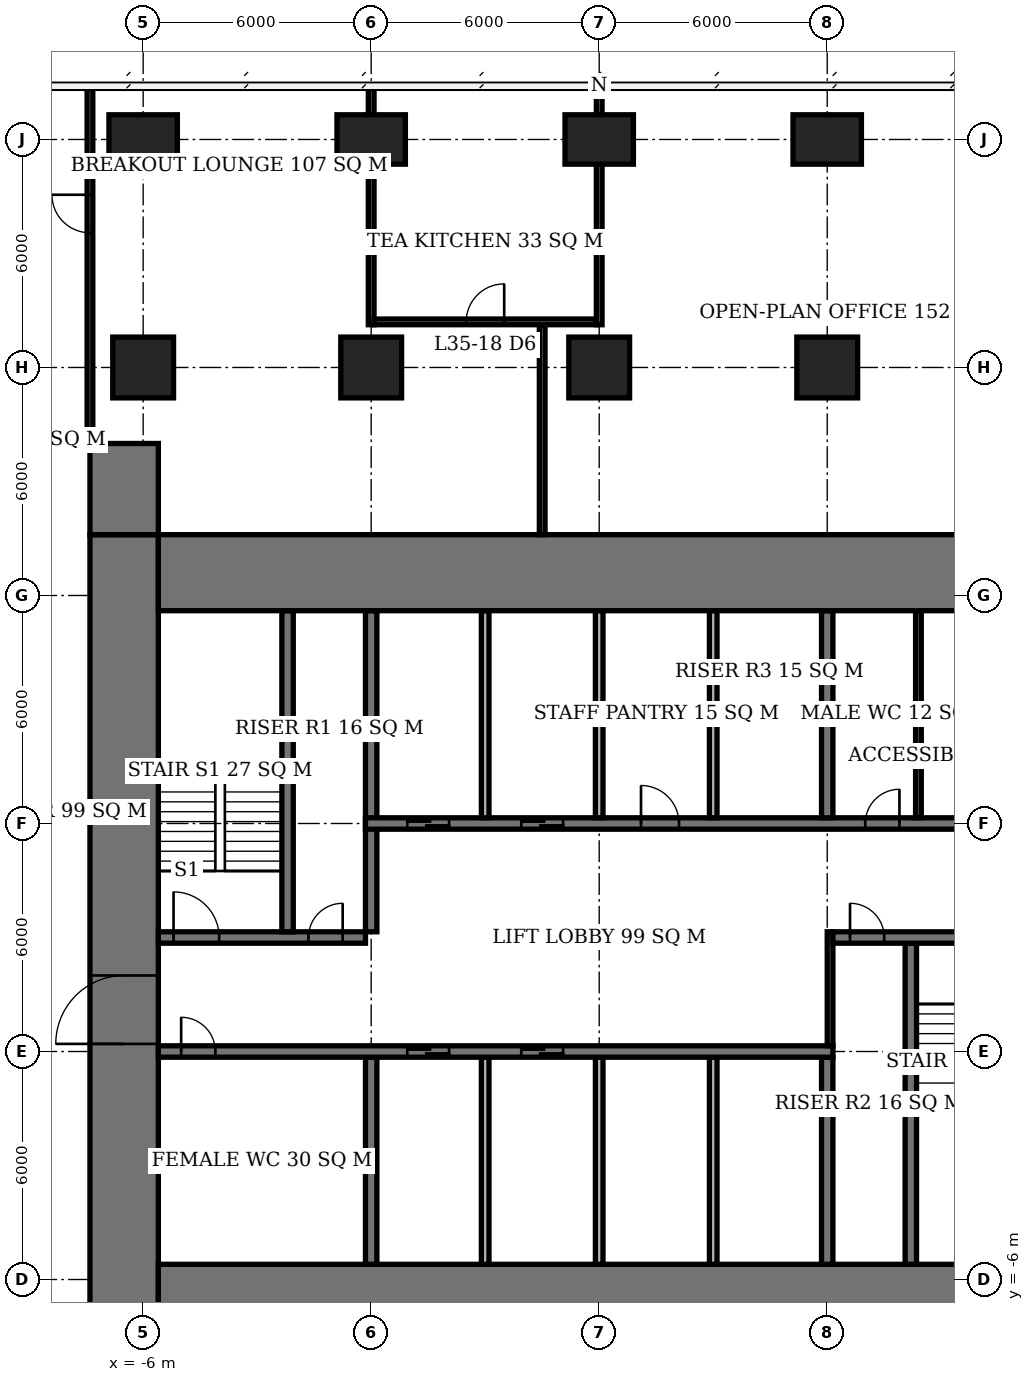
"""IFC4 building model, lengths in metres.
Left out: names, types, materials, properties, quantities, classifications, styles, units other than length and angle.
Written with IfcOpenShell. Run it as: python <this file> out.ifc"""

import sys

from ifc_helpers import new_model, si_unit, direction, frame, frame_2d, origin, origin_2d, place, context, subcontext, project, spatial, rectangle, extrude, element, fill, save


model = new_model("IFC4")
c1 = context("Model", 3, precision=1e-05, world=origin(), true_north=direction((0.0, 1.0)))
c2 = subcontext(c1, "Body", "Model", "MODEL_VIEW")
j1 = project(units=[si_unit("LENGTHUNIT", "METRE"), si_unit("PLANEANGLEUNIT", "RADIAN")], contexts=[c1])
p1 = place(None, origin())
s1 = spatial("IfcSite", under=j1, at=p1, CompositionType="ELEMENT")
p2 = place(p1, origin())
s2 = spatial("IfcBuilding", under=s1, at=p2, CompositionType="ELEMENT")
p3 = place(p2, frame((0.0, 0.0, 144.5)))
s3 = spatial("IfcBuildingStorey", under=s2, at=p3, CompositionType="ELEMENT", Elevation=144.5)
p4 = place(p3, frame((-6.0, 18.0, 0.0), z_axis=(0.0, 0.0, 1.0), x_axis=(1.0, 0.0, 0.0)))
e1 = element("IfcColumn", 1, at=p4, inside=s3, PredefinedType="COLUMN", context=c2, shape_type="SweptSolid", body=[
    extrude(rectangle(XDim=1.6, YDim=1.6, at=origin_2d()), origin(), (0.0, 0.0, 1.0), 3.9),
])
p5 = place(p3, frame((-6.0, 24.0, 0.0), z_axis=(0.0, 0.0, 1.0), x_axis=(1.0, 0.0, 0.0)))
e2 = element("IfcColumn", 2, at=p5, inside=s3, PredefinedType="COLUMN", context=c2, shape_type="SweptSolid", body=[
    extrude(rectangle(XDim=1.8, YDim=1.3, at=origin_2d()), origin(), (0.0, 0.0, 1.0), 3.9),
])
p6 = place(p3, frame((0.0, 18.0, 0.0), z_axis=(0.0, 0.0, 1.0), x_axis=(1.0, 0.0, 0.0)))
e3 = element("IfcColumn", 3, at=p6, inside=s3, PredefinedType="COLUMN", context=c2, shape_type="SweptSolid", body=[
    extrude(rectangle(XDim=1.6, YDim=1.6, at=origin_2d()), origin(), (0.0, 0.0, 1.0), 3.9),
])
p7 = place(p3, frame((0.0, 24.0, 0.0), z_axis=(0.0, 0.0, 1.0), x_axis=(1.0, 0.0, 0.0)))
e4 = element("IfcColumn", 4, at=p7, inside=s3, PredefinedType="COLUMN", context=c2, shape_type="SweptSolid", body=[
    extrude(rectangle(XDim=1.8, YDim=1.3, at=origin_2d()), origin(), (0.0, 0.0, 1.0), 3.9),
])
p8 = place(p3, frame((6.0, 18.0, 0.0), z_axis=(0.0, 0.0, 1.0), x_axis=(1.0, 0.0, 0.0)))
e5 = element("IfcColumn", 5, at=p8, inside=s3, PredefinedType="COLUMN", context=c2, shape_type="SweptSolid", body=[
    extrude(rectangle(XDim=1.6, YDim=1.6, at=origin_2d()), origin(), (0.0, 0.0, 1.0), 3.9),
])
p9 = place(p3, frame((6.0, 24.0, 0.0), z_axis=(0.0, 0.0, 1.0), x_axis=(1.0, 0.0, 0.0)))
e6 = element("IfcColumn", 6, at=p9, inside=s3, PredefinedType="COLUMN", context=c2, shape_type="SweptSolid", body=[
    extrude(rectangle(XDim=1.8, YDim=1.3, at=origin_2d()), origin(), (0.0, 0.0, 1.0), 3.9),
])
p10 = place(p3, frame((12.0, 18.0, 0.0), z_axis=(0.0, 0.0, 1.0), x_axis=(1.0, 0.0, 0.0)))
e7 = element("IfcColumn", 7, at=p10, inside=s3, PredefinedType="COLUMN", context=c2, shape_type="SweptSolid", body=[
    extrude(rectangle(XDim=1.6, YDim=1.6, at=origin_2d()), origin(), (0.0, 0.0, 1.0), 3.9),
])
p11 = place(p3, frame((12.0, 24.0, 0.0), z_axis=(0.0, 0.0, 1.0), x_axis=(1.0, 0.0, 0.0)))
e8 = element("IfcColumn", 8, at=p11, inside=s3, PredefinedType="COLUMN", context=c2, shape_type="SweptSolid", body=[
    extrude(rectangle(XDim=1.8, YDim=1.3, at=origin_2d()), origin(), (0.0, 0.0, 1.0), 3.9),
])
for number, where, z_axis, x_axis in (
    (9, (-5.6, -6.6, 0.0), (0.0, 0.0, 1.0), (1.0, 0.0, 0.0)),
    (10, (-5.6, 12.6, 0.0), (0.0, 0.0, 1.0), (1.0, 0.0, 0.0)),
):
    element("IfcWall", number, at=place(p3, frame(where, z_axis=z_axis, x_axis=x_axis)), inside=s3, PredefinedType="SHEAR", context=c2, shape_type="SweptSolid", body=[
        extrude(rectangle(XDim=23.2, YDim=2.0, at=frame_2d((11.6, 0.0))), origin(), (0.0, 0.0, 1.0), 3.9),
    ])
p12 = place(p3, frame((-6.5, -7.6, 0.0), z_axis=(0.0, 0.0, 1.0), x_axis=(0.0, 1.0, 0.0)))
e11 = element("IfcWall", 11, at=p12, inside=s3, PredefinedType="SHEAR", context=c2, shape_type="SweptSolid", body=[
    extrude(rectangle(XDim=21.2, YDim=1.8, at=frame_2d((10.6, 0.0))), origin(), (0.0, 0.0, 1.0), 3.9),
])
p13 = place(p12, frame((7.8, 0.0, 0.0)))
e12 = element("IfcOpeningElement", 12, at=p13, cuts=e11, PredefinedType="OPENING", context=c2, shape_type="SweptSolid", body=[
    extrude(rectangle(XDim=1.8, YDim=2.4, at=frame_2d((0.9, 1.2))), frame((0.0, 0.91, 0.0), z_axis=(0.0, -1.0, 0.0), x_axis=(1.0, 0.0, 0.0)), (0.0, 0.0, 1.0), 1.82),
])
p14 = place(p3, frame((-6.5, 13.6, 0.0), z_axis=(0.0, 0.0, 1.0), x_axis=(0.0, 1.0, 0.0)))
e13 = element("IfcWall", 13, at=p14, inside=s3, PredefinedType="SHEAR", context=c2, shape_type="SweptSolid", body=[
    extrude(rectangle(XDim=2.4, YDim=1.8, at=frame_2d((1.2, 0.0))), origin(), (0.0, 0.0, 1.0), 3.9),
])
p15 = place(p3, frame((-5.6, 0.0, 0.0), z_axis=(0.0, 0.0, 1.0), x_axis=(1.0, 0.0, 0.0)))
e14 = element("IfcWall", 14, at=p15, inside=s3, PredefinedType="SHEAR", context=c2, shape_type="SweptSolid", body=[
    extrude(rectangle(XDim=17.75, YDim=0.3, at=frame_2d((8.875, 0.0))), origin(), (0.0, 0.0, 1.0), 3.9),
])
p16 = place(p15, frame((0.6, 0.0, 0.0)))
e15 = element("IfcOpeningElement", 15, at=p16, cuts=e14, PredefinedType="OPENING", context=c2, shape_type="SweptSolid", body=[
    extrude(rectangle(XDim=0.9, YDim=2.1, at=frame_2d((0.45, 1.05))), frame((0.0, 0.16, 0.0), z_axis=(0.0, -1.0, 0.0), x_axis=(1.0, 0.0, 0.0)), (0.0, 0.0, 1.0), 0.32),
])
p17 = place(p15, frame((6.55, 0.0, 0.0)))
e16 = element("IfcOpeningElement", 16, at=p17, cuts=e14, PredefinedType="OPENING", context=c2, shape_type="SweptSolid", body=[
    extrude(rectangle(XDim=1.1, YDim=2.1, at=frame_2d((0.55, 1.05))), frame((0.0, 0.16, 0.0), z_axis=(0.0, -1.0, 0.0), x_axis=(1.0, 0.0, 0.0)), (0.0, 0.0, 1.0), 0.32),
])
p18 = place(p15, frame((9.55, 0.0, 0.0)))
e17 = element("IfcOpeningElement", 17, at=p18, cuts=e14, PredefinedType="OPENING", context=c2, shape_type="SweptSolid", body=[
    extrude(rectangle(XDim=1.1, YDim=2.1, at=frame_2d((0.55, 1.05))), frame((0.0, 0.16, 0.0), z_axis=(0.0, -1.0, 0.0), x_axis=(1.0, 0.0, 0.0)), (0.0, 0.0, 1.0), 0.32),
])
p19 = place(p3, frame((-5.6, 3.0, 0.0), z_axis=(0.0, 0.0, 1.0), x_axis=(1.0, 0.0, 0.0)))
e18 = element("IfcWall", 18, at=p19, inside=s3, PredefinedType="SHEAR", context=c2, shape_type="SweptSolid", body=[
    extrude(rectangle(XDim=5.45, YDim=0.3, at=frame_2d((2.725, 0.0))), origin(), (0.0, 0.0, 1.0), 3.9),
])
p20 = place(p19, frame((0.4, 0.0, 0.0)))
e19 = element("IfcOpeningElement", 19, at=p20, cuts=e18, PredefinedType="OPENING", context=c2, shape_type="SweptSolid", body=[
    extrude(rectangle(XDim=1.2, YDim=2.1, at=frame_2d((0.6, 1.05))), frame((0.0, 0.16, 0.0), z_axis=(0.0, -1.0, 0.0), x_axis=(1.0, 0.0, 0.0)), (0.0, 0.0, 1.0), 0.32),
])
p21 = place(p19, frame((3.95, 0.0, 0.0)))
e20 = element("IfcOpeningElement", 20, at=p21, cuts=e18, PredefinedType="OPENING", context=c2, shape_type="SweptSolid", body=[
    extrude(rectangle(XDim=0.9, YDim=2.1, at=frame_2d((0.45, 1.05))), frame((0.0, 0.16, 0.0), z_axis=(0.0, -1.0, 0.0), x_axis=(1.0, 0.0, 0.0)), (0.0, 0.0, 1.0), 0.32),
])
p22 = place(p3, frame((12.15, 3.0, 0.0), z_axis=(0.0, 0.0, 1.0), x_axis=(1.0, 0.0, 0.0)))
e21 = element("IfcWall", 21, at=p22, inside=s3, PredefinedType="SHEAR", context=c2, shape_type="SweptSolid", body=[
    extrude(rectangle(XDim=5.45, YDim=0.3, at=frame_2d((2.725, 0.0))), origin(), (0.0, 0.0, 1.0), 3.9),
])
p23 = place(p22, frame((3.25, 0.0, 0.0)))
e22 = element("IfcOpeningElement", 22, at=p23, cuts=e21, PredefinedType="OPENING", context=c2, shape_type="SweptSolid", body=[
    extrude(rectangle(XDim=1.2, YDim=2.1, at=frame_2d((0.6, 1.05))), frame((0.0, 0.16, 0.0), z_axis=(0.0, -1.0, 0.0), x_axis=(1.0, 0.0, 0.0)), (0.0, 0.0, 1.0), 0.32),
])
p24 = place(p22, frame((0.45, 0.0, 0.0)))
e23 = element("IfcOpeningElement", 23, at=p24, cuts=e21, PredefinedType="OPENING", context=c2, shape_type="SweptSolid", body=[
    extrude(rectangle(XDim=0.9, YDim=2.1, at=frame_2d((0.45, 1.05))), frame((0.0, 0.16, 0.0), z_axis=(0.0, -1.0, 0.0), x_axis=(1.0, 0.0, 0.0)), (0.0, 0.0, 1.0), 0.32),
])
p25 = place(p3, frame((-0.15, 6.0, 0.0), z_axis=(0.0, 0.0, 1.0), x_axis=(1.0, 0.0, 0.0)))
e24 = element("IfcWall", 24, at=p25, inside=s3, PredefinedType="SHEAR", context=c2, shape_type="SweptSolid", body=[
    extrude(rectangle(XDim=17.75, YDim=0.3, at=frame_2d((8.875, 0.0))), origin(), (0.0, 0.0, 1.0), 3.9),
])
p26 = place(p25, frame((13.15, 0.0, 0.0)))
e25 = element("IfcOpeningElement", 25, at=p26, cuts=e24, PredefinedType="OPENING", context=c2, shape_type="SweptSolid", body=[
    extrude(rectangle(XDim=0.9, YDim=2.1, at=frame_2d((0.45, 1.05))), frame((0.0, 0.16, 0.0), z_axis=(0.0, -1.0, 0.0), x_axis=(1.0, 0.0, 0.0)), (0.0, 0.0, 1.0), 0.32),
])
p27 = place(p25, frame((16.25, 0.0, 0.0)))
e26 = element("IfcOpeningElement", 26, at=p27, cuts=e24, PredefinedType="OPENING", context=c2, shape_type="SweptSolid", body=[
    extrude(rectangle(XDim=1.0, YDim=2.1, at=frame_2d((0.5, 1.05))), frame((0.0, 0.16, 0.0), z_axis=(0.0, -1.0, 0.0), x_axis=(1.0, 0.0, 0.0)), (0.0, 0.0, 1.0), 0.32),
])
p28 = place(p25, frame((7.25, 0.0, 0.0)))
e27 = element("IfcOpeningElement", 27, at=p28, cuts=e24, PredefinedType="OPENING", context=c2, shape_type="SweptSolid", body=[
    extrude(rectangle(XDim=1.0, YDim=2.1, at=frame_2d((0.5, 1.05))), frame((0.0, 0.16, 0.0), z_axis=(0.0, -1.0, 0.0), x_axis=(1.0, 0.0, 0.0)), (0.0, 0.0, 1.0), 0.32),
])
p29 = place(p25, frame((1.1, 0.0, 0.0)))
e28 = element("IfcOpeningElement", 28, at=p29, cuts=e24, PredefinedType="OPENING", context=c2, shape_type="SweptSolid", body=[
    extrude(rectangle(XDim=1.1, YDim=2.1, at=frame_2d((0.55, 1.05))), frame((0.0, 0.16, 0.0), z_axis=(0.0, -1.0, 0.0), x_axis=(1.0, 0.0, 0.0)), (0.0, 0.0, 1.0), 0.32),
])
p30 = place(p25, frame((4.1, 0.0, 0.0)))
e29 = element("IfcOpeningElement", 29, at=p30, cuts=e24, PredefinedType="OPENING", context=c2, shape_type="SweptSolid", body=[
    extrude(rectangle(XDim=1.1, YDim=2.1, at=frame_2d((0.55, 1.05))), frame((0.0, 0.16, 0.0), z_axis=(0.0, -1.0, 0.0), x_axis=(1.0, 0.0, 0.0)), (0.0, 0.0, 1.0), 0.32),
])
p31 = place(p3, frame((0.0, -5.6, 0.0), z_axis=(0.0, 0.0, 1.0), x_axis=(0.0, 1.0, 0.0)))
e30 = element("IfcWall", 30, at=p31, inside=s3, PredefinedType="SHEAR", context=c2, shape_type="SweptSolid", body=[
    extrude(rectangle(XDim=5.45, YDim=0.3, at=frame_2d((2.725, 0.0))), origin(), (0.0, 0.0, 1.0), 3.9),
])
p32 = place(p3, frame((0.0, 3.15, 0.0), z_axis=(0.0, 0.0, 1.0), x_axis=(0.0, 1.0, 0.0)))
e31 = element("IfcWall", 31, at=p32, inside=s3, PredefinedType="SHEAR", context=c2, shape_type="SweptSolid", body=[
    extrude(rectangle(XDim=8.45, YDim=0.3, at=frame_2d((4.225, 0.0))), origin(), (0.0, 0.0, 1.0), 3.9),
])
for number, where, z_axis, x_axis in (
    (32, (12.0, -5.6, 0.0), (0.0, 0.0, 1.0), (0.0, 1.0, 0.0)),
    (33, (12.0, 6.15, 0.0), (0.0, 0.0, 1.0), (0.0, 1.0, 0.0)),
):
    element("IfcWall", number, at=place(p3, frame(where, z_axis=z_axis, x_axis=x_axis)), inside=s3, PredefinedType="SHEAR", context=c2, shape_type="SweptSolid", body=[
        extrude(rectangle(XDim=5.45, YDim=0.3, at=frame_2d((2.725, 0.0))), origin(), (0.0, 0.0, 1.0), 3.9),
    ])
for number, where, z_axis, x_axis in (
    (34, (-2.2, 3.15, 0.0), (0.0, 0.0, 1.0), (0.0, 1.0, 0.0)),
    (35, (14.2, -5.6, 0.0), (0.0, 0.0, 1.0), (0.0, 1.0, 0.0)),
):
    element("IfcWall", number, at=place(p3, frame(where, z_axis=z_axis, x_axis=x_axis)), inside=s3, PredefinedType="SHEAR", context=c2, shape_type="SweptSolid", body=[
        extrude(rectangle(XDim=8.45, YDim=0.3, at=frame_2d((4.225, 0.0))), origin(), (0.0, 0.0, 1.0), 3.9),
    ])
for number, where, z_axis, x_axis in (
    (36, (3.0, 6.15, 0.0), (0.0, 0.0, 1.0), (0.0, 1.0, 0.0)),
    (37, (6.0, 6.15, 0.0), (0.0, 0.0, 1.0), (0.0, 1.0, 0.0)),
    (38, (9.0, 6.15, 0.0), (0.0, 0.0, 1.0), (0.0, 1.0, 0.0)),
    (39, (3.0, -5.6, 0.0), (0.0, 0.0, 1.0), (0.0, 1.0, 0.0)),
    (40, (6.0, -5.6, 0.0), (0.0, 0.0, 1.0), (0.0, 1.0, 0.0)),
    (41, (9.0, -5.6, 0.0), (0.0, 0.0, 1.0), (0.0, 1.0, 0.0)),
):
    element("IfcWall", number, at=place(p3, frame(where, z_axis=z_axis, x_axis=x_axis)), inside=s3, PredefinedType="SOLIDWALL", context=c2, shape_type="SweptSolid", body=[
        extrude(rectangle(XDim=5.45, YDim=0.2, at=frame_2d((2.725, 0.0))), origin(), (0.0, 0.0, 1.0), 3.9),
    ])
p33 = place(p3, frame((14.4, 6.15, 0.0), z_axis=(0.0, 0.0, 1.0), x_axis=(0.0, 1.0, 0.0)))
e42 = element("IfcWall", 42, at=p33, inside=s3, PredefinedType="PLUMBINGWALL", context=c2, shape_type="SweptSolid", body=[
    extrude(rectangle(XDim=5.45, YDim=0.15, at=frame_2d((2.725, 0.0))), origin(), (0.0, 0.0, 1.0), 3.65),
])
p34 = place(p3, frame((0.075, 19.2, 0.0), z_axis=(0.0, 0.0, 1.0), x_axis=(1.0, 0.0, 0.0)))
e43 = element("IfcWall", 43, at=p34, inside=s3, PredefinedType="PARTITIONING", context=c2, shape_type="SweptSolid", body=[
    extrude(rectangle(XDim=5.85, YDim=0.15, at=frame_2d((2.925, 0.0))), origin(), (0.0, 0.0, 1.0), 3.65),
])
p35 = place(p34, frame((2.425, 0.0, 0.0)))
e44 = element("IfcOpeningElement", 44, at=p35, cuts=e43, PredefinedType="OPENING", context=c2, shape_type="SweptSolid", body=[
    extrude(rectangle(XDim=1.0, YDim=2.1, at=frame_2d((0.5, 1.05))), frame((0.0, 0.085, 0.0), z_axis=(0.0, -1.0, 0.0), x_axis=(1.0, 0.0, 0.0)), (0.0, 0.0, 1.0), 0.17),
])
p36 = place(p3, frame((0.0, 19.125, 0.0), z_axis=(0.0, 0.0, 1.0), x_axis=(0.0, 1.0, 0.0)))
e45 = element("IfcWall", 45, at=p36, inside=s3, PredefinedType="PARTITIONING", context=c2, shape_type="SweptSolid", body=[
    extrude(rectangle(XDim=4.225, YDim=0.15, at=frame_2d((2.113, 0.0))), origin(), (0.0, 0.0, 1.0), 3.65),
])
p37 = place(p3, frame((0.0, 24.65, 0.0), z_axis=(0.0, 0.0, 1.0), x_axis=(0.0, 1.0, 0.0)))
e46 = element("IfcWall", 46, at=p37, inside=s3, PredefinedType="PARTITIONING", context=c2, shape_type="SweptSolid", body=[
    extrude(rectangle(XDim=0.75, YDim=0.15, at=frame_2d((0.375, 0.0))), origin(), (0.0, 0.0, 1.0), 3.65),
])
p38 = place(p3, frame((6.0, 19.125, 0.0), z_axis=(0.0, 0.0, 1.0), x_axis=(0.0, 1.0, 0.0)))
e47 = element("IfcWall", 47, at=p38, inside=s3, PredefinedType="PARTITIONING", context=c2, shape_type="SweptSolid", body=[
    extrude(rectangle(XDim=4.225, YDim=0.15, at=frame_2d((2.113, 0.0))), origin(), (0.0, 0.0, 1.0), 3.65),
])
p39 = place(p3, frame((6.0, 24.65, 0.0), z_axis=(0.0, 0.0, 1.0), x_axis=(0.0, 1.0, 0.0)))
e48 = element("IfcWall", 48, at=p39, inside=s3, PredefinedType="PARTITIONING", context=c2, shape_type="SweptSolid", body=[
    extrude(rectangle(XDim=0.7, YDim=0.15, at=frame_2d((0.35, 0.0))), origin(), (0.0, 0.0, 1.0), 3.65),
])
p40 = place(p3, frame((-7.4, 16.0, 0.0), z_axis=(0.0, 0.0, 1.0), x_axis=(0.0, 1.0, 0.0)))
e49 = element("IfcWall", 49, at=p40, inside=s3, PredefinedType="PARTITIONING", context=c2, shape_type="SweptSolid", body=[
    extrude(rectangle(XDim=9.4, YDim=0.15, at=frame_2d((4.7, 0.0))), origin(), (0.0, 0.0, 1.0), 3.65),
])
p41 = place(p40, frame((5.545, 0.0, 0.0)))
e50 = element("IfcOpeningElement", 50, at=p41, cuts=e49, PredefinedType="OPENING", context=c2, shape_type="SweptSolid", body=[
    extrude(rectangle(XDim=1.0, YDim=2.1, at=frame_2d((0.5, 1.05))), frame((0.0, 0.085, 0.0), z_axis=(0.0, -1.0, 0.0), x_axis=(1.0, 0.0, 0.0)), (0.0, 0.0, 1.0), 0.17),
])
p42 = place(p3, frame((4.5, 13.6, 0.0), z_axis=(0.0, 0.0, 1.0), x_axis=(0.0, 1.0, 0.0)))
e51 = element("IfcWall", 51, at=p42, inside=s3, PredefinedType="PARTITIONING", context=c2, shape_type="SweptSolid", body=[
    extrude(rectangle(XDim=5.525, YDim=0.15, at=frame_2d((2.762, 0.0))), origin(), (0.0, 0.0, 1.0), 3.65),
])
p43 = place(p3, frame((12.075, 0.15, 0.0), z_axis=(0.0, 0.0, 1.0), x_axis=(0.0, 1.0, 0.0)))
e52 = element("IfcWall", 52, at=p43, inside=s3, PredefinedType="PARTITIONING", context=c2, shape_type="SweptSolid", body=[
    extrude(rectangle(XDim=3.0, YDim=0.15, at=frame_2d((1.5, 0.0))), origin(), (0.0, 0.0, 1.0), 3.65),
])
p44 = place(p13, origin())
e53 = element("IfcDoor", 53, at=p44, inside=s3, OperationType="DOUBLE_DOOR_SINGLE_SWING", PredefinedType="DOOR", context=c2, shape_type="SweptSolid", body=[
    extrude(rectangle(XDim=1.8, YDim=2.4, at=frame_2d((0.9, 1.2))), frame((0.0, 0.025, 0.0), z_axis=(0.0, -1.0, 0.0), x_axis=(1.0, 0.0, 0.0)), (0.0, 0.0, 1.0), 0.05),
])
fill(e12, e53)
p45 = place(p20, origin())
e54 = element("IfcDoor", 54, at=p45, inside=s3, OperationType="SINGLE_SWING_LEFT", PredefinedType="DOOR", context=c2, shape_type="SweptSolid", body=[
    extrude(rectangle(XDim=1.2, YDim=2.1, at=frame_2d((0.6, 1.05))), frame((0.0, 0.025, 0.0), z_axis=(0.0, -1.0, 0.0), x_axis=(1.0, 0.0, 0.0)), (0.0, 0.0, 1.0), 0.05),
])
fill(e19, e54)
p46 = place(p21, origin())
e55 = element("IfcDoor", 55, at=p46, inside=s3, OperationType="SINGLE_SWING_RIGHT", PredefinedType="DOOR", context=c2, shape_type="SweptSolid", body=[
    extrude(rectangle(XDim=0.9, YDim=2.1, at=frame_2d((0.45, 1.05))), frame((0.0, 0.025, 0.0), z_axis=(0.0, -1.0, 0.0), x_axis=(1.0, 0.0, 0.0)), (0.0, 0.0, 1.0), 0.05),
])
fill(e20, e55)
p47 = place(p24, origin())
e56 = element("IfcDoor", 56, at=p47, inside=s3, OperationType="SINGLE_SWING_LEFT", PredefinedType="DOOR", context=c2, shape_type="SweptSolid", body=[
    extrude(rectangle(XDim=0.9, YDim=2.1, at=frame_2d((0.45, 1.05))), frame((0.0, 0.025, 0.0), z_axis=(0.0, -1.0, 0.0), x_axis=(1.0, 0.0, 0.0)), (0.0, 0.0, 1.0), 0.05),
])
fill(e23, e56)
p48 = place(p16, origin())
e57 = element("IfcDoor", 57, at=p48, inside=s3, OperationType="SINGLE_SWING_LEFT", PredefinedType="DOOR", context=c2, shape_type="SweptSolid", body=[
    extrude(rectangle(XDim=0.9, YDim=2.1, at=frame_2d((0.45, 1.05))), frame((0.0, 0.025, 0.0), z_axis=(0.0, -1.0, 0.0), x_axis=(1.0, 0.0, 0.0)), (0.0, 0.0, 1.0), 0.05),
])
fill(e15, e57)
p49 = place(p26, origin())
e58 = element("IfcDoor", 58, at=p49, inside=s3, OperationType="SINGLE_SWING_RIGHT", PredefinedType="DOOR", context=c2, shape_type="SweptSolid", body=[
    extrude(rectangle(XDim=0.9, YDim=2.1, at=frame_2d((0.45, 1.05))), frame((0.0, 0.025, 0.0), z_axis=(0.0, -1.0, 0.0), x_axis=(1.0, 0.0, 0.0)), (0.0, 0.0, 1.0), 0.05),
])
fill(e25, e58)
p50 = place(p28, origin())
e59 = element("IfcDoor", 59, at=p50, inside=s3, OperationType="SINGLE_SWING_LEFT", PredefinedType="DOOR", context=c2, shape_type="SweptSolid", body=[
    extrude(rectangle(XDim=1.0, YDim=2.1, at=frame_2d((0.5, 1.05))), frame((0.0, 0.025, 0.0), z_axis=(0.0, -1.0, 0.0), x_axis=(1.0, 0.0, 0.0)), (0.0, 0.0, 1.0), 0.05),
])
fill(e27, e59)
p51 = place(p29, origin())
e60 = element("IfcDoor", 60, at=p51, inside=s3, OperationType="DOUBLE_DOOR_SLIDING", PredefinedType="USERDEFINED", context=c2, shape_type="SweptSolid", body=[
    extrude(rectangle(XDim=1.1, YDim=2.1, at=frame_2d((0.55, 1.05))), frame((0.0, 0.025, 0.0), z_axis=(0.0, -1.0, 0.0), x_axis=(1.0, 0.0, 0.0)), (0.0, 0.0, 1.0), 0.05),
])
fill(e28, e60)
p52 = place(p30, origin())
e61 = element("IfcDoor", 61, at=p52, inside=s3, OperationType="DOUBLE_DOOR_SLIDING", PredefinedType="USERDEFINED", context=c2, shape_type="SweptSolid", body=[
    extrude(rectangle(XDim=1.1, YDim=2.1, at=frame_2d((0.55, 1.05))), frame((0.0, 0.025, 0.0), z_axis=(0.0, -1.0, 0.0), x_axis=(1.0, 0.0, 0.0)), (0.0, 0.0, 1.0), 0.05),
])
fill(e29, e61)
p53 = place(p17, origin())
e62 = element("IfcDoor", 62, at=p53, inside=s3, OperationType="DOUBLE_DOOR_SLIDING", PredefinedType="USERDEFINED", context=c2, shape_type="SweptSolid", body=[
    extrude(rectangle(XDim=1.1, YDim=2.1, at=frame_2d((0.55, 1.05))), frame((0.0, 0.025, 0.0), z_axis=(0.0, -1.0, 0.0), x_axis=(1.0, 0.0, 0.0)), (0.0, 0.0, 1.0), 0.05),
])
fill(e16, e62)
p54 = place(p18, origin())
e63 = element("IfcDoor", 63, at=p54, inside=s3, OperationType="DOUBLE_DOOR_SLIDING", PredefinedType="USERDEFINED", context=c2, shape_type="SweptSolid", body=[
    extrude(rectangle(XDim=1.1, YDim=2.1, at=frame_2d((0.55, 1.05))), frame((0.0, 0.025, 0.0), z_axis=(0.0, -1.0, 0.0), x_axis=(1.0, 0.0, 0.0)), (0.0, 0.0, 1.0), 0.05),
])
fill(e17, e63)
p55 = place(p35, origin())
e64 = element("IfcDoor", 64, at=p55, inside=s3, OperationType="SINGLE_SWING_RIGHT", PredefinedType="DOOR", context=c2, shape_type="SweptSolid", body=[
    extrude(rectangle(XDim=1.0, YDim=2.1, at=frame_2d((0.5, 1.05))), frame((0.0, 0.025, 0.0), z_axis=(0.0, -1.0, 0.0), x_axis=(1.0, 0.0, 0.0)), (0.0, 0.0, 1.0), 0.05),
])
fill(e44, e64)
p56 = place(p41, origin())
e65 = element("IfcDoor", 65, at=p56, inside=s3, OperationType="SINGLE_SWING_RIGHT", PredefinedType="DOOR", context=c2, shape_type="SweptSolid", body=[
    extrude(rectangle(XDim=1.0, YDim=2.1, at=frame_2d((0.5, 1.05))), frame((0.0, 0.025, 0.0), z_axis=(0.0, -1.0, 0.0), x_axis=(1.0, 0.0, 0.0)), (0.0, 0.0, 1.0), 0.05),
])
fill(e50, e65)
save(model, sys.argv[1])
